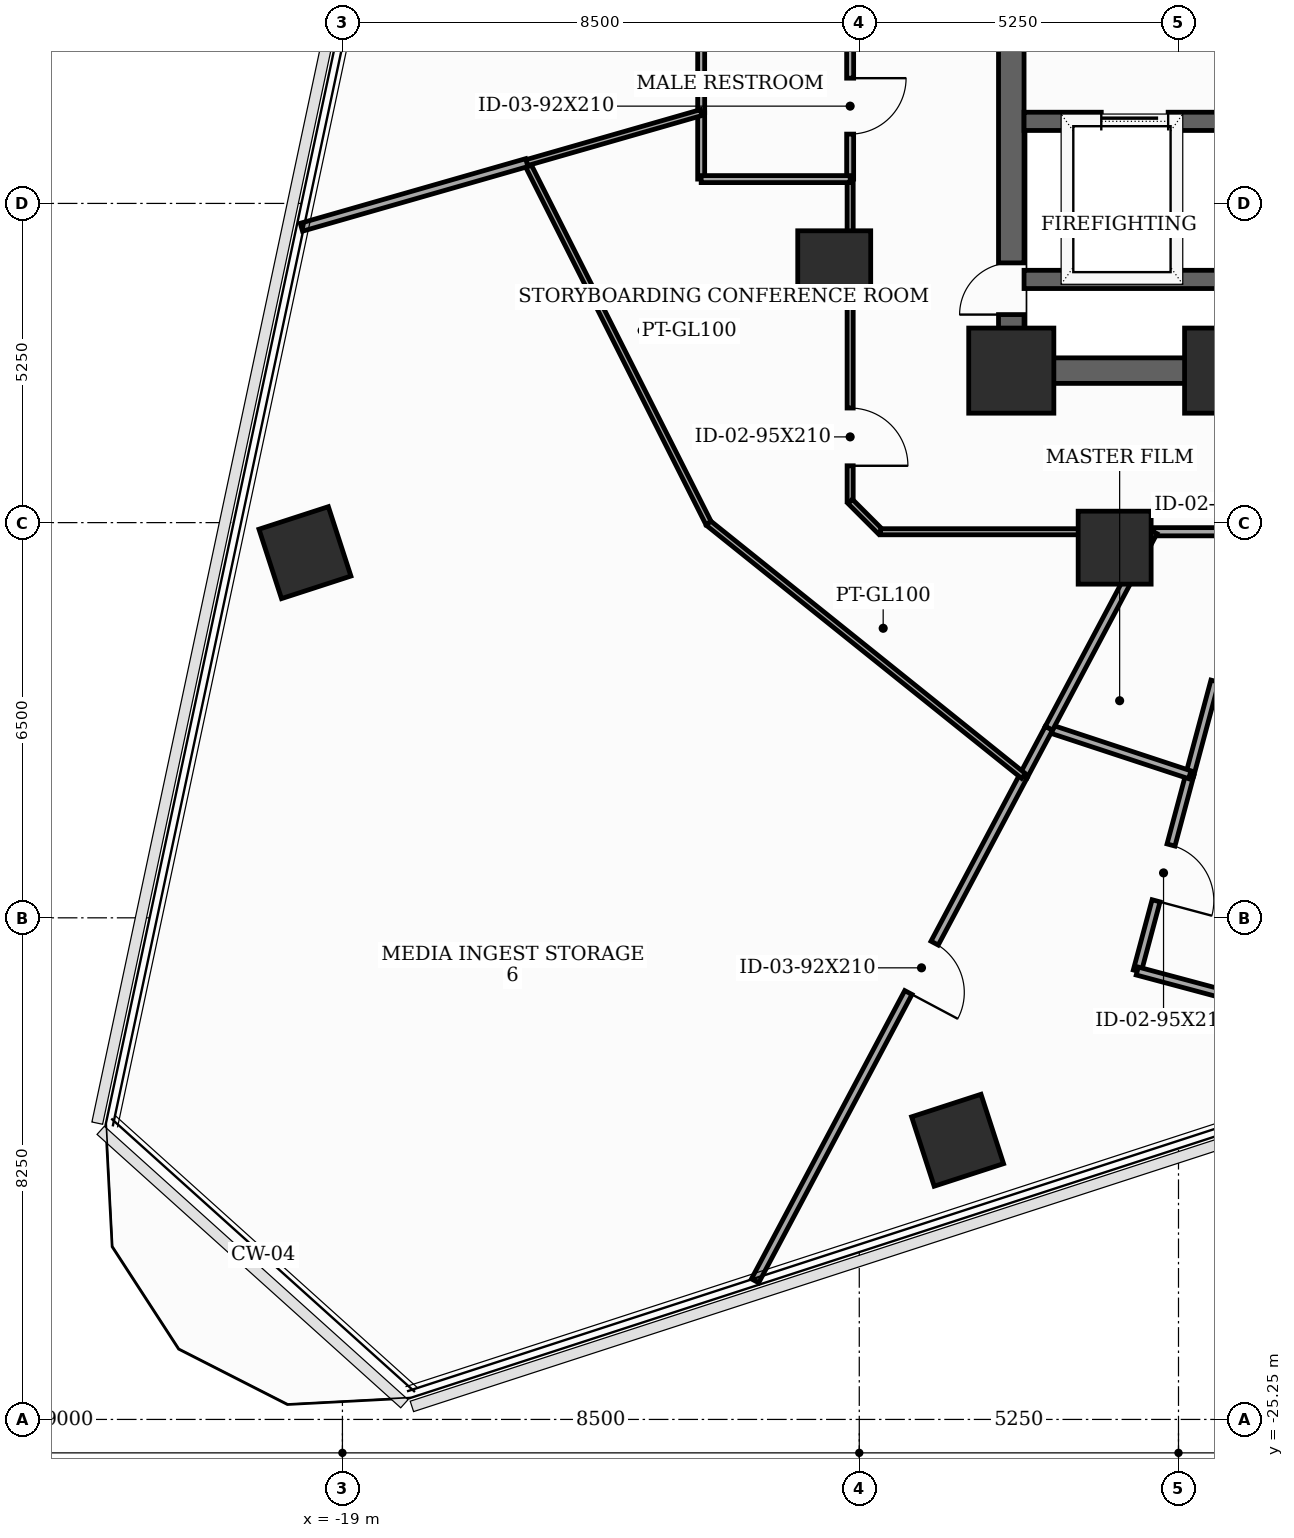
"""IFC4 building model, lengths in metres.
Left out: names, types, materials, properties, quantities, classifications, styles, units other than length and angle.
Written with IfcOpenShell. Run it as: python <this file> out.ifc"""

import sys

from ifc_helpers import new_model, si_unit, direction, frame, frame_2d, origin, origin_2d, place, context, subcontext, project, spatial, rectangle, extrude, element, fill, save


model = new_model("IFC4")
c1 = context("Model", 3, precision=1e-05, world=origin(), true_north=direction((0.0, 1.0)))
c2 = subcontext(c1, "Body", "Model", "MODEL_VIEW")
j1 = project(units=[si_unit("LENGTHUNIT", "METRE"), si_unit("PLANEANGLEUNIT", "RADIAN")], contexts=[c1])
p1 = place(None, origin())
s1 = spatial("IfcSite", under=j1, at=p1, CompositionType="ELEMENT")
p2 = place(p1, origin())
s2 = spatial("IfcBuilding", under=s1, at=p2, CompositionType="ELEMENT")
p3 = place(p2, frame((0.0, 0.0, 97.7)))
s3 = spatial("IfcBuildingStorey", under=s2, at=p3, CompositionType="ELEMENT", Elevation=97.7)
for number, where, z_axis, x_axis in (
    (1, (-8.0, -8.0, 0.0), (0.0, 0.0, 1.0), (1.0, 0.0, 0.0)),
    (2, (-4.45, -8.0, 0.0), (0.0, 0.0, 1.0), (1.0, 0.0, 0.0)),
):
    element("IfcColumn", number, at=place(p3, frame(where, z_axis=z_axis, x_axis=x_axis)), inside=s3, PredefinedType="COLUMN", context=c2, shape_type="SweptSolid", body=[
        extrude(rectangle(XDim=1.4, YDim=1.4, at=origin_2d()), origin(), (0.0, 0.0, 1.0), 3.7),
    ])
for number, where, z_axis, x_axis in (
    (3, (-10.912, -6.3, 0.0), (0.0, 0.0, 1.0), (1.0, 0.0, 0.0)),
    (4, (-6.3, -10.912, 0.0), (0.0, 0.0, 1.0), (1.0, 0.0, 0.0)),
    (5, (-8.883, -20.658, 0.0), (0.0, 0.0, 1.0), (0.951, 0.309, 0.0)),
    (6, (-19.616, -10.994, 0.0), (0.0, 0.0, 1.0), (0.951, 0.309, 0.0)),
):
    element("IfcColumn", number, at=place(p3, frame(where, z_axis=z_axis, x_axis=x_axis)), inside=s3, PredefinedType="COLUMN", context=c2, shape_type="SweptSolid", body=[
        extrude(rectangle(XDim=1.2, YDim=1.2, at=origin_2d()), origin(), (0.0, 0.0, 1.0), 3.7),
    ])
p4 = place(p3, frame((-8.0, -8.0, 0.0), z_axis=(0.0, 0.0, 1.0), x_axis=(0.0, 1.0, 0.0)))
e7 = element("IfcWall", 7, at=p4, inside=s3, PredefinedType="SHEAR", context=c2, shape_type="SweptSolid", body=[
    extrude(rectangle(XDim=16.0, YDim=0.42, at=frame_2d((8.0, 0.0))), origin(), (0.0, 0.0, 1.0), 3.5),
])
p5 = place(p4, frame((0.922, 0.0, 0.0)))
e8 = element("IfcOpeningElement", 8, at=p5, cuts=e7, PredefinedType="OPENING", context=c2, shape_type="SweptSolid", body=[
    extrude(rectangle(XDim=0.85, YDim=2.02, at=frame_2d((0.425, 1.01))), frame((0.0, 0.22, 0.0), z_axis=(0.0, -1.0, 0.0), x_axis=(1.0, 0.0, 0.0)), (0.0, 0.0, 1.0), 0.44),
])
p6 = place(p4, frame((5.35, 0.0, 0.0)))
e9 = element("IfcOpeningElement", 9, at=p6, cuts=e7, PredefinedType="OPENING", context=c2, shape_type="SweptSolid", body=[
    extrude(rectangle(XDim=1.05, YDim=2.15, at=frame_2d((0.525, 1.075))), frame((0.0, 0.22, 0.0), z_axis=(0.0, -1.0, 0.0), x_axis=(1.0, 0.0, 0.0)), (0.0, 0.0, 1.0), 0.44),
])
p7 = place(p3, frame((-8.0, -8.0, 0.0), z_axis=(0.0, 0.0, 1.0), x_axis=(1.0, 0.0, 0.0)))
e10 = element("IfcWall", 10, at=p7, inside=s3, PredefinedType="SHEAR", context=c2, shape_type="SweptSolid", body=[
    extrude(rectangle(XDim=16.0, YDim=0.42, at=frame_2d((8.0, 0.0))), origin(), (0.0, 0.0, 1.0), 3.5),
])
p8 = place(p7, frame((5.2, 0.0, 0.0)))
e11 = element("IfcOpeningElement", 11, at=p8, cuts=e10, PredefinedType="OPENING", context=c2, shape_type="SweptSolid", body=[
    extrude(rectangle(XDim=0.95, YDim=2.1, at=frame_2d((0.475, 1.05))), frame((0.0, 0.22, 0.0), z_axis=(0.0, -1.0, 0.0), x_axis=(1.0, 0.0, 0.0)), (0.0, 0.0, 1.0), 0.44),
])
p9 = place(p7, frame((9.8, 0.0, 0.0)))
e12 = element("IfcOpeningElement", 12, at=p9, cuts=e10, PredefinedType="OPENING", context=c2, shape_type="SweptSolid", body=[
    extrude(rectangle(XDim=0.95, YDim=2.1, at=frame_2d((0.475, 1.05))), frame((0.0, 0.22, 0.0), z_axis=(0.0, -1.0, 0.0), x_axis=(1.0, 0.0, 0.0)), (0.0, 0.0, 1.0), 0.44),
])
p10 = place(p3, frame((-7.79, -3.9, 0.0), z_axis=(0.0, 0.0, 1.0), x_axis=(1.0, 0.0, 0.0)))
e13 = element("IfcWall", 13, at=p10, inside=s3, PredefinedType="SHEAR", context=c2, shape_type="SweptSolid", body=[
    extrude(rectangle(XDim=3.34, YDim=0.3, at=frame_2d((1.67, 0.0))), origin(), (0.0, 0.0, 1.0), 3.5),
])
p11 = place(p10, frame((1.27, 0.0, 0.0)))
e14 = element("IfcOpeningElement", 14, at=p11, cuts=e13, PredefinedType="OPENING", context=c2, shape_type="SweptSolid", body=[
    extrude(rectangle(XDim=1.1, YDim=2.1, at=frame_2d((0.55, 1.05))), frame((0.0, 0.16, 0.0), z_axis=(0.0, -1.0, 0.0), x_axis=(1.0, 0.0, 0.0)), (0.0, 0.0, 1.0), 0.32),
])
p12 = place(p3, frame((-7.79, -6.5, 0.0), z_axis=(0.0, 0.0, 1.0), x_axis=(1.0, 0.0, 0.0)))
e15 = element("IfcWall", 15, at=p12, inside=s3, PredefinedType="SHEAR", context=c2, shape_type="SweptSolid", body=[
    extrude(rectangle(XDim=3.34, YDim=0.3, at=frame_2d((1.67, 0.0))), origin(), (0.0, 0.0, 1.0), 3.5),
])
p13 = place(p3, frame((-5.663, -10.65, 0.0), z_axis=(0.0, 0.0, 1.0), x_axis=(1.0, 0.0, 0.0)))
e16 = element("IfcWall", 16, at=p13, inside=s3, PredefinedType="PARTITIONING", context=c2, shape_type="SweptSolid", body=[
    extrude(rectangle(XDim=1.671, YDim=0.135, at=frame_2d((0.835, 0.0))), origin(), (0.0, 0.0, 1.0), 3.5),
])
p14 = place(p3, frame((-3.992, -10.65, 0.0), z_axis=(0.0, 0.0, 1.0), x_axis=(-0.259046685972, -0.96586480135, 0.0)))
e17 = element("IfcWall", 17, at=p14, inside=s3, PredefinedType="PARTITIONING", context=c2, shape_type="SweptSolid", body=[
    extrude(rectangle(XDim=4.138, YDim=0.135, at=frame_2d((2.069, 0.0))), origin(), (0.0, 0.0, 1.0), 2.785),
])
p15 = place(p14, frame((1.594, 0.0, 0.0)))
e18 = element("IfcOpeningElement", 18, at=p15, cuts=e17, PredefinedType="OPENING", context=c2, shape_type="SweptSolid", body=[
    extrude(rectangle(XDim=0.95, YDim=2.1, at=frame_2d((0.475, 1.05))), frame((0.0, 0.077, 0.0), z_axis=(0.0, -1.0, 0.0), x_axis=(1.0, 0.0, 0.0)), (0.0, 0.0, 1.0), 0.155),
])
p16 = place(p3, frame((-5.064, -14.647, 0.0), z_axis=(0.0, 0.0, 1.0), x_axis=(-0.258558355083, -0.965995640268, 0.0)))
e19 = element("IfcWall", 19, at=p16, inside=s3, PredefinedType="PARTITIONING", context=c2, shape_type="SweptSolid", body=[
    extrude(rectangle(XDim=3.342, YDim=0.135, at=frame_2d((1.671, 0.0))), origin(), (0.0, 0.0, 1.0), 3.125),
])
p17 = place(p16, frame((1.196, 0.0, 0.0)))
e20 = element("IfcOpeningElement", 20, at=p17, cuts=e19, PredefinedType="OPENING", context=c2, shape_type="SweptSolid", body=[
    extrude(rectangle(XDim=0.95, YDim=2.1, at=frame_2d((0.475, 1.05))), frame((0.0, 0.077, 0.0), z_axis=(0.0, -1.0, 0.0), x_axis=(1.0, 0.0, 0.0)), (0.0, 0.0, 1.0), 0.155),
])
p18 = place(p3, frame((-5.928, -17.875, 0.0), z_axis=(0.0, 0.0, 1.0), x_axis=(0.965959937537, -0.258691706618, 0.0)))
e21 = element("IfcWall", 21, at=p18, inside=s3, PredefinedType="PARTITIONING", context=c2, shape_type="SweptSolid", body=[
    extrude(rectangle(XDim=2.2, YDim=0.135, at=frame_2d((1.1, 0.0))), origin(), (0.0, 0.0, 1.0), 3.5),
])
p19 = place(p3, frame((-10.65, -2.45, 0.0), z_axis=(0.0, 0.0, 1.0), x_axis=(0.0, -1.0, 0.0)))
e22 = element("IfcWall", 22, at=p19, inside=s3, PredefinedType="PARTITIONING", context=c2, shape_type="SweptSolid", body=[
    extrude(rectangle(XDim=2.4, YDim=0.115, at=frame_2d((1.2, 0.0))), origin(), (0.0, 0.0, 1.0), 3.5),
])
p20 = place(p19, frame((0.74, 0.0, 0.0)))
e23 = element("IfcOpeningElement", 23, at=p20, cuts=e22, PredefinedType="OPENING", context=c2, shape_type="SweptSolid", body=[
    extrude(rectangle(XDim=0.92, YDim=2.1, at=frame_2d((0.46, 1.05))), frame((0.0, 0.067, 0.0), z_axis=(0.0, -1.0, 0.0), x_axis=(1.0, 0.0, 0.0)), (0.0, 0.0, 1.0), 0.135),
])
p21 = place(p3, frame((-10.65, -4.85, 0.0), z_axis=(0.0, 0.0, 1.0), x_axis=(0.0, -1.0, 0.0)))
e24 = element("IfcWall", 24, at=p21, inside=s3, PredefinedType="MOVABLE", context=c2, shape_type="SweptSolid", body=[
    extrude(rectangle(XDim=5.3, YDim=0.1, at=frame_2d((2.65, 0.0))), origin(), (0.0, 0.0, 1.0), 2.785),
])
p22 = place(p21, frame((3.765, 0.0, 0.0)))
e25 = element("IfcOpeningElement", 25, at=p22, cuts=e24, PredefinedType="OPENING", context=c2, shape_type="SweptSolid", body=[
    extrude(rectangle(XDim=0.95, YDim=2.1, at=frame_2d((0.475, 1.05))), frame((0.0, 0.06, 0.0), z_axis=(0.0, -1.0, 0.0), x_axis=(1.0, 0.0, 0.0)), (0.0, 0.0, 1.0), 0.12),
])
p23 = place(p3, frame((-10.65, -10.15, 0.0), z_axis=(0.0, 0.0, 1.0), x_axis=(0.707106781187, -0.707106781187, 0.0)))
e26 = element("IfcWall", 26, at=p23, inside=s3, PredefinedType="MOVABLE", context=c2, shape_type="SweptSolid", body=[
    extrude(rectangle(XDim=0.707, YDim=0.1, at=frame_2d((0.354, 0.0))), origin(), (0.0, 0.0, 1.0), 3.5),
])
p24 = place(p3, frame((-10.15, -10.65, 0.0), z_axis=(0.0, 0.0, 1.0), x_axis=(1.0, 0.0, 0.0)))
e27 = element("IfcWall", 27, at=p24, inside=s3, PredefinedType="MOVABLE", context=c2, shape_type="SweptSolid", body=[
    extrude(rectangle(XDim=4.487, YDim=0.1, at=frame_2d((2.243, 0.0))), origin(), (0.0, 0.0, 1.0), 2.785),
])
p25 = place(p3, frame((-7.382, -13.883, 0.0), z_axis=(0.0, 0.0, 1.0), x_axis=(0.949758055829, -0.312985040199, 0.0)))
e28 = element("IfcWall", 28, at=p25, inside=s3, PredefinedType="PARTITIONING", context=c2, shape_type="SweptSolid", body=[
    extrude(rectangle(XDim=2.441, YDim=0.135, at=frame_2d((1.22, 0.0))), origin(), (0.0, 0.0, 1.0), 2.785),
])
p26 = place(p3, frame((-5.663, -10.65, 0.0), z_axis=(0.0, 0.0, 1.0), x_axis=(-0.469449315633, -0.882959421521, 0.0)))
e29 = element("IfcWall", 29, at=p26, inside=s3, PredefinedType="PARTITIONING", context=c2, shape_type="SweptSolid", body=[
    extrude(rectangle(XDim=3.662, YDim=0.135, at=frame_2d((1.831, 0.0))), origin(), (0.0, 0.0, 1.0), 2.785),
])
p27 = place(p3, frame((-7.382, -13.883, 0.0), z_axis=(0.0, 0.0, 1.0), x_axis=(-0.469617532863, -0.882869963714, 0.0)))
e30 = element("IfcWall", 30, at=p27, inside=s3, PredefinedType="PARTITIONING", context=c2, shape_type="SweptSolid", body=[
    extrude(rectangle(XDim=0.888, YDim=0.135, at=frame_2d((0.444, 0.0))), origin(), (0.0, 0.0, 1.0), 2.785),
])
p28 = place(p3, frame((-7.799, -14.667, 0.0), z_axis=(0.0, 0.0, 1.0), x_axis=(-0.469441180524, -0.882963746723, 0.0)))
e31 = element("IfcWall", 31, at=p28, inside=s3, PredefinedType="PARTITIONING", context=c2, shape_type="SweptSolid", body=[
    extrude(rectangle(XDim=9.404, YDim=0.135, at=frame_2d((4.702, 0.0))), origin(), (0.0, 0.0, 1.0), 2.935),
])
p29 = place(p28, frame((3.114, 0.0, 0.0)))
e32 = element("IfcOpeningElement", 32, at=p29, cuts=e31, PredefinedType="OPENING", context=c2, shape_type="SweptSolid", body=[
    extrude(rectangle(XDim=0.92, YDim=2.1, at=frame_2d((0.46, 1.05))), frame((0.0, 0.077, 0.0), z_axis=(0.0, -1.0, 0.0), x_axis=(1.0, 0.0, 0.0)), (0.0, 0.0, 1.0), 0.155),
])
p30 = place(p3, frame((-13.1, -3.756, 0.0), z_axis=(0.0, 0.0, 1.0), x_axis=(0.0, -1.0, 0.0)))
e33 = element("IfcWall", 33, at=p30, inside=s3, PredefinedType="PARTITIONING", context=c2, shape_type="SweptSolid", body=[
    extrude(rectangle(XDim=1.094, YDim=0.115, at=frame_2d((0.547, 0.0))), origin(), (0.0, 0.0, 1.0), 3.5),
])
p31 = place(p3, frame((-13.1, -4.85, 0.0), z_axis=(0.0, 0.0, 1.0), x_axis=(1.0, 0.0, 0.0)))
e34 = element("IfcWall", 34, at=p31, inside=s3, PredefinedType="PARTITIONING", context=c2, shape_type="SweptSolid", body=[
    extrude(rectangle(XDim=2.45, YDim=0.115, at=frame_2d((1.225, 0.0))), origin(), (0.0, 0.0, 1.0), 2.785),
])
p32 = place(p3, frame((-13.1, -2.45, 0.0), z_axis=(0.0, 0.0, 1.0), x_axis=(0.0, -1.0, 0.0)))
e35 = element("IfcWall", 35, at=p32, inside=s3, PredefinedType="PARTITIONING", context=c2, shape_type="SweptSolid", body=[
    extrude(rectangle(XDim=1.306, YDim=0.115, at=frame_2d((0.653, 0.0))), origin(), (0.0, 0.0, 1.0), 3.5),
])
p33 = place(p3, frame((-15.968, -4.579, 0.0), z_axis=(0.0, 0.0, 1.0), x_axis=(0.450166439867, -0.892944665933, 0.0)))
e36 = element("IfcWall", 36, at=p33, inside=s3, PredefinedType="MOVABLE", context=c2, shape_type="SweptSolid", body=[
    extrude(rectangle(XDim=6.642, YDim=0.1, at=frame_2d((3.321, 0.0))), origin(), (0.0, 0.0, 1.0), 2.785),
])
p34 = place(p3, frame((-12.978, -10.51, 0.0), z_axis=(0.0, 0.0, 1.0), x_axis=(0.779852762203, -0.625962993543, 0.0)))
e37 = element("IfcWall", 37, at=p34, inside=s3, PredefinedType="MOVABLE", context=c2, shape_type="SweptSolid", body=[
    extrude(rectangle(XDim=6.641, YDim=0.1, at=frame_2d((3.32, 0.0))), origin(), (0.0, 0.0, 1.0), 3.5),
])
p35 = place(p3, frame((-13.1, -3.756, 0.0), z_axis=(0.0, 0.0, 1.0), x_axis=(-0.961205264208, -0.275834080671, 0.0)))
e38 = element("IfcWall", 38, at=p35, inside=s3, PredefinedType="MOVABLE", context=c2, shape_type="SweptSolid", body=[
    extrude(rectangle(XDim=2.984, YDim=0.1, at=frame_2d((1.492, 0.0))), origin(), (0.0, 0.0, 1.0), 3.125),
])
p36 = place(p3, frame((-15.968, -4.579, 0.0), z_axis=(0.0, 0.0, 1.0), x_axis=(-0.961294264275, -0.275523751194, 0.0)))
e39 = element("IfcWall", 39, at=p36, inside=s3, PredefinedType="PARTITIONING", context=c2, shape_type="SweptSolid", body=[
    extrude(rectangle(XDim=3.856, YDim=0.135, at=frame_2d((1.928, 0.0))), origin(), (0.0, 0.0, 1.0), 2.935),
])
p37 = place(p5, origin())
e40 = element("IfcDoor", 40, at=p37, inside=s3, OperationType="SINGLE_SWING_LEFT", PredefinedType="TRAPDOOR", context=c2, shape_type="SweptSolid", body=[
    extrude(rectangle(XDim=0.85, YDim=2.02, at=frame_2d((0.425, 1.01))), frame((0.0, 0.025, 0.0), z_axis=(0.0, -1.0, 0.0), x_axis=(1.0, 0.0, 0.0)), (0.0, 0.0, 1.0), 0.05),
])
fill(e8, e40)
p38 = place(p11, origin())
e41 = element("IfcDoor", 41, at=p38, inside=s3, OperationType="SLIDING_TO_LEFT", PredefinedType="DOOR", context=c2, shape_type="SweptSolid", body=[
    extrude(rectangle(XDim=1.1, YDim=2.1, at=frame_2d((0.55, 1.05))), frame((0.0, 0.025, 0.0), z_axis=(0.0, -1.0, 0.0), x_axis=(1.0, 0.0, 0.0)), (0.0, 0.0, 1.0), 0.05),
])
fill(e14, e41)
p39 = place(p15, origin())
e42 = element("IfcDoor", 42, at=p39, inside=s3, OperationType="SINGLE_SWING_LEFT", PredefinedType="DOOR", context=c2, shape_type="SweptSolid", body=[
    extrude(rectangle(XDim=0.95, YDim=2.1, at=frame_2d((0.475, 1.05))), frame((0.0, 0.025, 0.0), z_axis=(0.0, -1.0, 0.0), x_axis=(1.0, 0.0, 0.0)), (0.0, 0.0, 1.0), 0.05),
])
fill(e18, e42)
p40 = place(p17, origin())
e43 = element("IfcDoor", 43, at=p40, inside=s3, OperationType="SINGLE_SWING_RIGHT", PredefinedType="DOOR", context=c2, shape_type="SweptSolid", body=[
    extrude(rectangle(XDim=0.95, YDim=2.1, at=frame_2d((0.475, 1.05))), frame((0.0, 0.025, 0.0), z_axis=(0.0, -1.0, 0.0), x_axis=(1.0, 0.0, 0.0)), (0.0, 0.0, 1.0), 0.05),
])
fill(e20, e43)
p41 = place(p20, origin())
e44 = element("IfcDoor", 44, at=p41, inside=s3, OperationType="SINGLE_SWING_LEFT", PredefinedType="DOOR", context=c2, shape_type="SweptSolid", body=[
    extrude(rectangle(XDim=0.92, YDim=2.1, at=frame_2d((0.46, 1.05))), frame((0.0, 0.025, 0.0), z_axis=(0.0, -1.0, 0.0), x_axis=(1.0, 0.0, 0.0)), (0.0, 0.0, 1.0), 0.05),
])
fill(e23, e44)
p42 = place(p22, origin())
e45 = element("IfcDoor", 45, at=p42, inside=s3, OperationType="SINGLE_SWING_RIGHT", PredefinedType="DOOR", context=c2, shape_type="SweptSolid", body=[
    extrude(rectangle(XDim=0.95, YDim=2.1, at=frame_2d((0.475, 1.05))), frame((0.0, 0.025, 0.0), z_axis=(0.0, -1.0, 0.0), x_axis=(1.0, 0.0, 0.0)), (0.0, 0.0, 1.0), 0.05),
])
fill(e25, e45)
p43 = place(p29, origin())
e46 = element("IfcDoor", 46, at=p43, inside=s3, OperationType="SINGLE_SWING_RIGHT", PredefinedType="DOOR", context=c2, shape_type="SweptSolid", body=[
    extrude(rectangle(XDim=0.92, YDim=2.1, at=frame_2d((0.46, 1.05))), frame((0.0, 0.025, 0.0), z_axis=(0.0, -1.0, 0.0), x_axis=(1.0, 0.0, 0.0)), (0.0, 0.0, 1.0), 0.05),
])
fill(e32, e46)
save(model, sys.argv[1])
